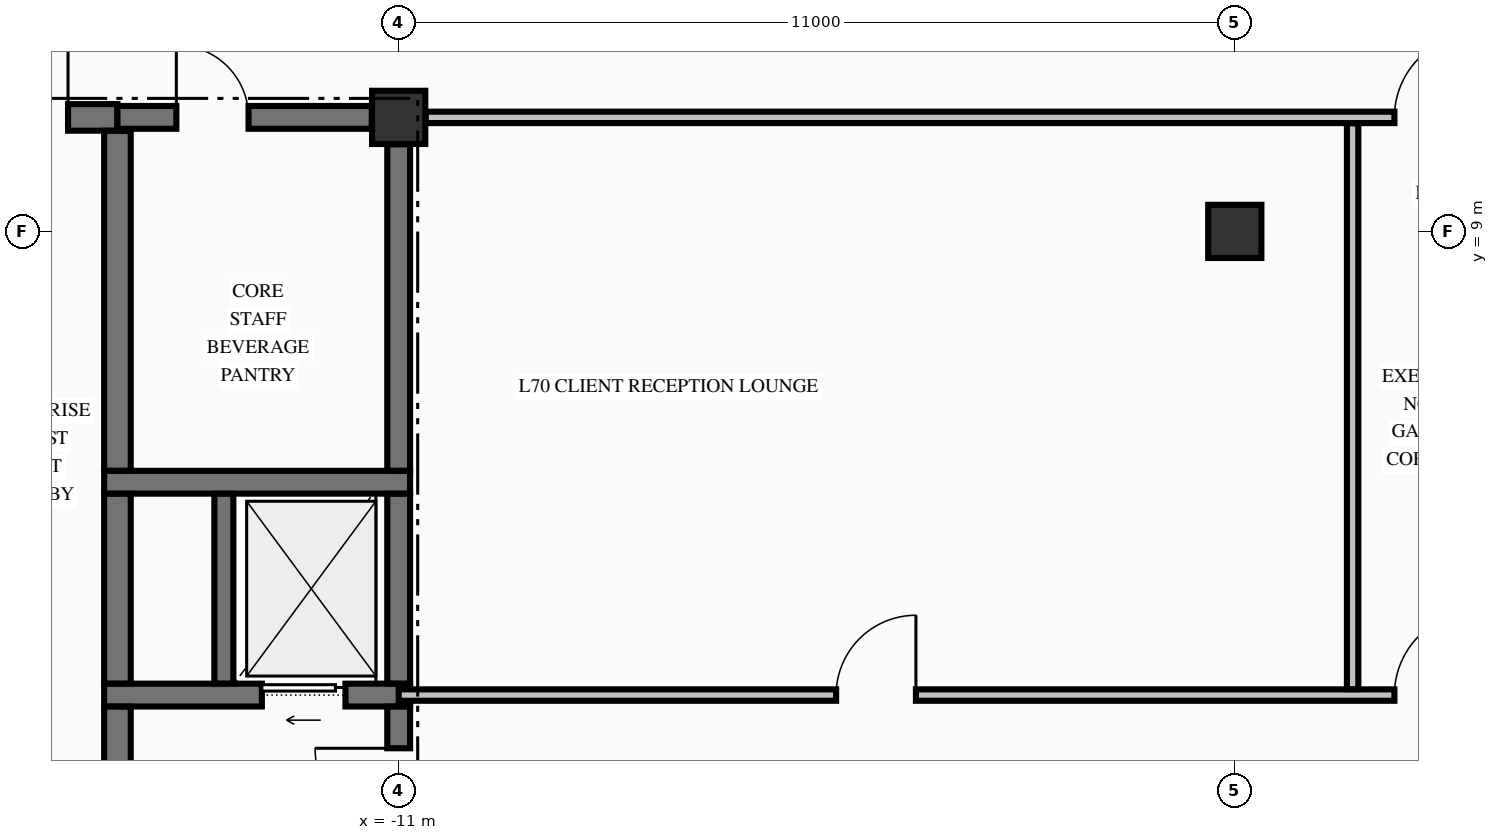
"""IFC4 building model, lengths in metres.
Left out: names, types, materials, properties, quantities, classifications, styles, units other than length and angle.
Written with IfcOpenShell. Run it as: python <this file> out.ifc"""

import sys

from ifc_helpers import new_model, si_unit, direction, frame, frame_2d, origin, origin_2d, place, context, subcontext, project, spatial, rectangle, extrude, element, fill, save


model = new_model("IFC4")
c1 = context("Model", 3, precision=1e-05, world=origin(), true_north=direction((0.0, 1.0)))
c2 = subcontext(c1, "Body", "Model", "MODEL_VIEW")
j1 = project(units=[si_unit("LENGTHUNIT", "METRE"), si_unit("PLANEANGLEUNIT", "RADIAN")], contexts=[c1])
p1 = place(None, origin())
s1 = spatial("IfcSite", under=j1, at=p1, CompositionType="ELEMENT")
p2 = place(p1, origin())
s2 = spatial("IfcBuilding", under=s1, at=p2, CompositionType="ELEMENT")
p3 = place(p2, frame((0.0, 0.0, 264.12)))
s3 = spatial("IfcBuildingStorey", under=s2, at=p3, CompositionType="ELEMENT", Elevation=264.12)
for number, where, z_axis, x_axis in (
    (1, (-11.0, 10.5, -0.25), (0.0, 0.0, 1.0), (1.0, 0.0, 0.0)),
    (2, (0.0, 9.0, -0.25), (0.0, 0.0, 1.0), (1.0, 0.0, 0.0)),
):
    element("IfcColumn", number, at=place(p3, frame(where, z_axis=z_axis, x_axis=x_axis)), inside=s3, PredefinedType="COLUMN", context=c2, shape_type="SweptSolid", body=[
        extrude(rectangle(XDim=0.7, YDim=0.7, at=origin_2d()), origin(), (0.0, 0.0, 1.0), 3.23),
    ])
p4 = place(p3, frame((-14.875, 2.9, 0.0), z_axis=(0.0, 0.0, 1.0), x_axis=(1.0, 0.0, 0.0)))
e3 = element("IfcWall", 3, at=p4, inside=s3, PredefinedType="SHEAR", context=c2, shape_type="SweptSolid", body=[
    extrude(rectangle(XDim=4.025, YDim=0.3, at=frame_2d((2.012, 0.0))), origin(), (0.0, 0.0, 1.0), 2.98),
])
p5 = place(p4, frame((2.075, 0.0, 0.0)))
e4 = element("IfcOpeningElement", 4, at=p5, cuts=e3, PredefinedType="OPENING", context=c2, shape_type="SweptSolid", body=[
    extrude(rectangle(XDim=1.1, YDim=2.2, at=frame_2d((0.55, 1.1))), frame((0.0, 0.16, 0.0), z_axis=(0.0, -1.0, 0.0), x_axis=(1.0, 0.0, 0.0)), (0.0, 0.0, 1.0), 0.32),
])
p6 = place(p3, frame((-14.875, 5.7, 0.0), z_axis=(0.0, 0.0, 1.0), x_axis=(1.0, 0.0, 0.0)))
e5 = element("IfcWall", 5, at=p6, inside=s3, PredefinedType="SHEAR", context=c2, shape_type="SweptSolid", body=[
    extrude(rectangle(XDim=4.025, YDim=0.3, at=frame_2d((2.012, 0.0))), origin(), (0.0, 0.0, 1.0), 2.98),
])
p7 = place(p3, frame((-19.646, 10.5, 0.0), z_axis=(0.0, 0.0, 1.0), x_axis=(1.0, 0.0, 0.0)))
e6 = element("IfcWall", 6, at=p7, inside=s3, PredefinedType="SHEAR", context=c2, shape_type="SweptSolid", body=[
    extrude(rectangle(XDim=4.946, YDim=0.35, at=frame_2d((2.473, 0.0))), origin(), (0.0, 0.0, 1.0), 2.98),
])
p8 = place(p7, frame((3.196, 0.0, 0.0)))
e7 = element("IfcOpeningElement", 7, at=p8, cuts=e6, PredefinedType="OPENING", context=c2, shape_type="SweptSolid", body=[
    extrude(rectangle(XDim=1.1, YDim=2.15, at=frame_2d((0.55, 1.075))), frame((0.0, 0.185, 0.0), z_axis=(0.0, -1.0, 0.0), x_axis=(1.0, 0.0, 0.0)), (0.0, 0.0, 1.0), 0.37),
])
p9 = place(p3, frame((-14.7, 10.5, 0.0), z_axis=(0.0, 0.0, 1.0), x_axis=(1.0, 0.0, 0.0)))
e8 = element("IfcWall", 8, at=p9, inside=s3, PredefinedType="SHEAR", context=c2, shape_type="SweptSolid", body=[
    extrude(rectangle(XDim=3.346, YDim=0.3, at=frame_2d((1.673, 0.0))), origin(), (0.0, 0.0, 1.0), 2.98),
])
p10 = place(p9, frame((0.775, 0.0, 0.0)))
e9 = element("IfcOpeningElement", 9, at=p10, cuts=e8, PredefinedType="OPENING", context=c2, shape_type="SweptSolid", body=[
    extrude(rectangle(XDim=0.95, YDim=2.15, at=frame_2d((0.475, 1.075))), frame((0.0, 0.16, 0.0), z_axis=(0.0, -1.0, 0.0), x_axis=(1.0, 0.0, 0.0)), (0.0, 0.0, 1.0), 0.32),
])
p11 = place(p3, frame((-11.0, 2.9, 0.0), z_axis=(0.0, 0.0, 1.0), x_axis=(1.0, 0.0, 0.0)))
e10 = element("IfcWall", 10, at=p11, inside=s3, PredefinedType="PARTITIONING", context=c2, shape_type="SweptSolid", body=[
    extrude(rectangle(XDim=22.0, YDim=0.15, at=frame_2d((11.0, 0.0))), origin(), (0.0, 0.0, 1.0), 2.98),
])
p12 = place(p11, frame((13.1, 0.0, 0.0)))
e11 = element("IfcOpeningElement", 11, at=p12, cuts=e10, PredefinedType="OPENING", context=c2, shape_type="SweptSolid", body=[
    extrude(rectangle(XDim=1.1, YDim=2.15, at=frame_2d((0.55, 1.075))), frame((0.0, 0.085, 0.0), z_axis=(0.0, -1.0, 0.0), x_axis=(1.0, 0.0, 0.0)), (0.0, 0.0, 1.0), 0.17),
])
p13 = place(p11, frame((5.755, 0.0, 0.0)))
e12 = element("IfcOpeningElement", 12, at=p13, cuts=e10, PredefinedType="OPENING", context=c2, shape_type="SweptSolid", body=[
    extrude(rectangle(XDim=1.05, YDim=2.15, at=frame_2d((0.525, 1.075))), frame((0.0, 0.085, 0.0), z_axis=(0.0, -1.0, 0.0), x_axis=(1.0, 0.0, 0.0)), (0.0, 0.0, 1.0), 0.17),
])
p14 = place(p11, frame((17.83, 0.0, 0.0)))
e13 = element("IfcOpeningElement", 13, at=p14, cuts=e10, PredefinedType="OPENING", context=c2, shape_type="SweptSolid", body=[
    extrude(rectangle(XDim=1.1, YDim=2.15, at=frame_2d((0.55, 1.075))), frame((0.0, 0.085, 0.0), z_axis=(0.0, -1.0, 0.0), x_axis=(1.0, 0.0, 0.0)), (0.0, 0.0, 1.0), 0.17),
])
p15 = place(p3, frame((-10.644, 10.5, 0.0), z_axis=(0.0, 0.0, 1.0), x_axis=(1.0, 0.0, 0.0)))
e14 = element("IfcWall", 14, at=p15, inside=s3, PredefinedType="PARTITIONING", context=c2, shape_type="SweptSolid", body=[
    extrude(rectangle(XDim=21.288, YDim=0.15, at=frame_2d((10.644, 0.0))), origin(), (0.0, 0.0, 1.0), 2.98),
])
p16 = place(p15, frame((12.744, 0.0, 0.0)))
e15 = element("IfcOpeningElement", 15, at=p16, cuts=e14, PredefinedType="OPENING", context=c2, shape_type="SweptSolid", body=[
    extrude(rectangle(XDim=1.1, YDim=2.15, at=frame_2d((0.55, 1.075))), frame((0.0, 0.085, 0.0), z_axis=(0.0, -1.0, 0.0), x_axis=(1.0, 0.0, 0.0)), (0.0, 0.0, 1.0), 0.17),
])
p17 = place(p3, frame((-14.7, -0.098, 0.0), z_axis=(0.0, 0.0, 1.0), x_axis=(0.0, 1.0, 0.0)))
e16 = element("IfcWall", 16, at=p17, inside=s3, PredefinedType="SHEAR", context=c2, shape_type="SweptSolid", body=[
    extrude(rectangle(XDim=2.846, YDim=0.35, at=frame_2d((1.423, 0.0))), origin(), (0.0, 0.0, 1.0), 2.98),
])
p18 = place(p3, frame((-14.7, 3.052, 0.0), z_axis=(0.0, 0.0, 1.0), x_axis=(0.0, 1.0, 0.0)))
e17 = element("IfcWall", 17, at=p18, inside=s3, PredefinedType="SHEAR", context=c2, shape_type="SweptSolid", body=[
    extrude(rectangle(XDim=2.496, YDim=0.35, at=frame_2d((1.248, 0.0))), origin(), (0.0, 0.0, 1.0), 2.98),
])
p19 = place(p3, frame((-14.7, 5.852, 0.0), z_axis=(0.0, 0.0, 1.0), x_axis=(0.0, 1.0, 0.0)))
e18 = element("IfcWall", 18, at=p19, inside=s3, PredefinedType="SHEAR", context=c2, shape_type="SweptSolid", body=[
    extrude(rectangle(XDim=4.471, YDim=0.35, at=frame_2d((2.235, 0.0))), origin(), (0.0, 0.0, 1.0), 2.98),
])
p20 = place(p3, frame((-13.3, 3.052, 0.0), z_axis=(0.0, 0.0, 1.0), x_axis=(0.0, 1.0, 0.0)))
e19 = element("IfcWall", 19, at=p20, inside=s3, PredefinedType="SOLIDWALL", context=c2, shape_type="SweptSolid", body=[
    extrude(rectangle(XDim=2.496, YDim=0.25, at=frame_2d((1.248, 0.0))), origin(), (0.0, 0.0, 1.0), 2.98),
])
p21 = place(p3, frame((-11.0, 0.354, 0.0), z_axis=(0.0, 0.0, 1.0), x_axis=(0.0, 1.0, 0.0)))
e20 = element("IfcWall", 20, at=p21, inside=s3, PredefinedType="SHEAR", context=c2, shape_type="SweptSolid", body=[
    extrude(rectangle(XDim=2.394, YDim=0.3, at=frame_2d((1.197, 0.0))), origin(), (0.0, 0.0, 1.0), 2.98),
])
p22 = place(p21, frame((0.746, 0.0, 0.0)))
e21 = element("IfcOpeningElement", 21, at=p22, cuts=e20, PredefinedType="OPENING", context=c2, shape_type="SweptSolid", body=[
    extrude(rectangle(XDim=1.1, YDim=2.15, at=frame_2d((0.55, 1.075))), frame((0.0, 0.16, 0.0), z_axis=(0.0, -1.0, 0.0), x_axis=(1.0, 0.0, 0.0)), (0.0, 0.0, 1.0), 0.32),
])
p23 = place(p3, frame((-11.0, 3.052, 0.0), z_axis=(0.0, 0.0, 1.0), x_axis=(0.0, 1.0, 0.0)))
e22 = element("IfcWall", 22, at=p23, inside=s3, PredefinedType="SHEAR", context=c2, shape_type="SweptSolid", body=[
    extrude(rectangle(XDim=2.496, YDim=0.3, at=frame_2d((1.248, 0.0))), origin(), (0.0, 0.0, 1.0), 2.98),
])
p24 = place(p3, frame((-11.0, 5.852, 0.0), z_axis=(0.0, 0.0, 1.0), x_axis=(0.0, 1.0, 0.0)))
e23 = element("IfcWall", 23, at=p24, inside=s3, PredefinedType="SHEAR", context=c2, shape_type="SweptSolid", body=[
    extrude(rectangle(XDim=4.294, YDim=0.3, at=frame_2d((2.147, 0.0))), origin(), (0.0, 0.0, 1.0), 2.98),
])
p25 = place(p3, frame((1.55, 2.978, 0.0), z_axis=(0.0, 0.0, 1.0), x_axis=(0.0, 1.0, 0.0)))
e24 = element("IfcWall", 24, at=p25, inside=s3, PredefinedType="PARTITIONING", context=c2, shape_type="SweptSolid", body=[
    extrude(rectangle(XDim=7.444, YDim=0.15, at=frame_2d((3.722, 0.0))), origin(), (0.0, 0.0, 1.0), 2.98),
])
p26 = place(p22, origin())
e25 = element("IfcDoor", 25, at=p26, inside=s3, OperationType="SINGLE_SWING_RIGHT", PredefinedType="DOOR", context=c2, shape_type="SweptSolid", body=[
    extrude(rectangle(XDim=1.1, YDim=2.15, at=frame_2d((0.55, 1.075))), frame((0.0, 0.025, 0.0), z_axis=(0.0, -1.0, 0.0), x_axis=(1.0, 0.0, 0.0)), (0.0, 0.0, 1.0), 0.05),
])
fill(e21, e25)
p27 = place(p5, origin())
e26 = element("IfcDoor", 26, at=p27, inside=s3, OperationType="SLIDING_TO_LEFT", PredefinedType="DOOR", context=c2, shape_type="SweptSolid", body=[
    extrude(rectangle(XDim=1.1, YDim=2.2, at=frame_2d((0.55, 1.1))), frame((0.0, 0.025, 0.0), z_axis=(0.0, -1.0, 0.0), x_axis=(1.0, 0.0, 0.0)), (0.0, 0.0, 1.0), 0.05),
])
fill(e4, e26)
p28 = place(p10, origin())
e27 = element("IfcDoor", 27, at=p28, inside=s3, OperationType="SINGLE_SWING_LEFT", PredefinedType="DOOR", context=c2, shape_type="SweptSolid", body=[
    extrude(rectangle(XDim=0.95, YDim=2.15, at=frame_2d((0.475, 1.075))), frame((0.0, 0.025, 0.0), z_axis=(0.0, -1.0, 0.0), x_axis=(1.0, 0.0, 0.0)), (0.0, 0.0, 1.0), 0.05),
])
fill(e9, e27)
p29 = place(p8, origin())
e28 = element("IfcDoor", 28, at=p29, inside=s3, OperationType="SINGLE_SWING_RIGHT", PredefinedType="DOOR", context=c2, shape_type="SweptSolid", body=[
    extrude(rectangle(XDim=1.1, YDim=2.15, at=frame_2d((0.55, 1.075))), frame((0.0, 0.025, 0.0), z_axis=(0.0, -1.0, 0.0), x_axis=(1.0, 0.0, 0.0)), (0.0, 0.0, 1.0), 0.05),
])
fill(e7, e28)
p30 = place(p16, origin())
e29 = element("IfcDoor", 29, at=p30, inside=s3, OperationType="SINGLE_SWING_RIGHT", PredefinedType="DOOR", context=c2, shape_type="SweptSolid", body=[
    extrude(rectangle(XDim=1.1, YDim=2.15, at=frame_2d((0.55, 1.075))), frame((0.0, 0.025, 0.0), z_axis=(0.0, -1.0, 0.0), x_axis=(1.0, 0.0, 0.0)), (0.0, 0.0, 1.0), 0.05),
])
fill(e15, e29)
p31 = place(p12, origin())
e30 = element("IfcDoor", 30, at=p31, inside=s3, OperationType="SINGLE_SWING_RIGHT", PredefinedType="DOOR", context=c2, shape_type="SweptSolid", body=[
    extrude(rectangle(XDim=1.1, YDim=2.15, at=frame_2d((0.55, 1.075))), frame((0.0, 0.025, 0.0), z_axis=(0.0, -1.0, 0.0), x_axis=(1.0, 0.0, 0.0)), (0.0, 0.0, 1.0), 0.05),
])
fill(e11, e30)
p32 = place(p13, origin())
e31 = element("IfcDoor", 31, at=p32, inside=s3, OperationType="SINGLE_SWING_RIGHT", PredefinedType="DOOR", context=c2, shape_type="SweptSolid", body=[
    extrude(rectangle(XDim=1.05, YDim=2.15, at=frame_2d((0.525, 1.075))), frame((0.0, 0.025, 0.0), z_axis=(0.0, -1.0, 0.0), x_axis=(1.0, 0.0, 0.0)), (0.0, 0.0, 1.0), 0.05),
])
fill(e12, e31)
save(model, sys.argv[1])
